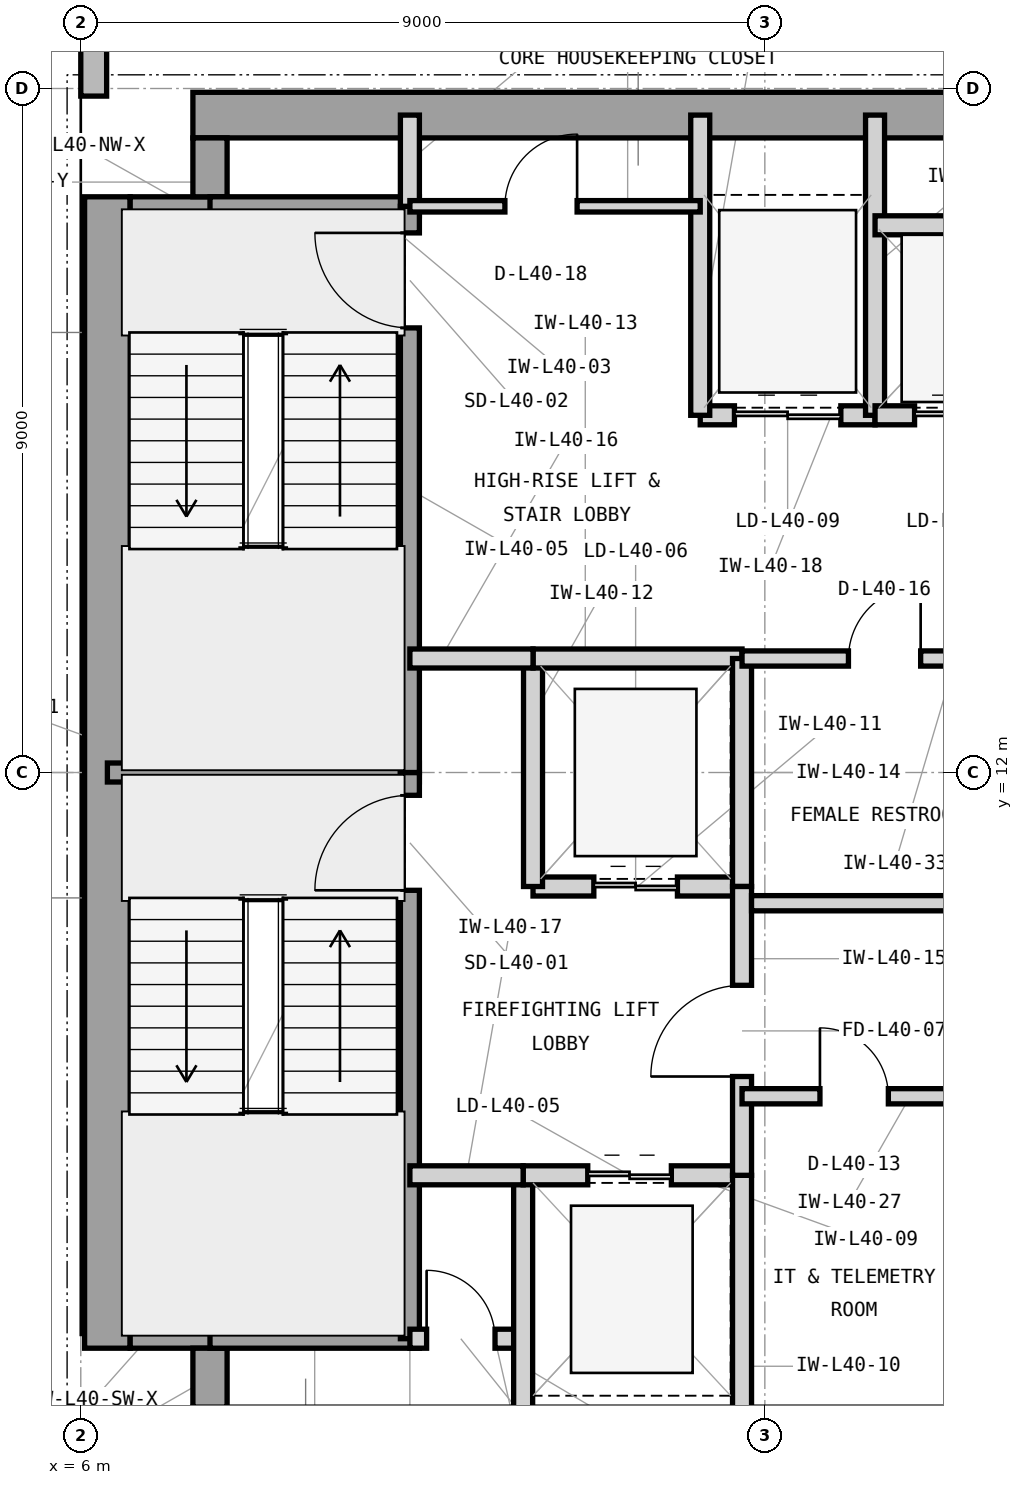
"""IFC4 building model, lengths in metres.
Left out: names, types, materials, properties, quantities, classifications, styles, units other than length and angle.
Written with IfcOpenShell. Run it as: python <this file> out.ifc"""

import sys

from ifc_helpers import new_model, si_unit, direction, frame, frame_2d, origin, place, context, subcontext, project, spatial, rectangle, extrude, element, fill, save


model = new_model("IFC4")
c1 = context("Model", 3, precision=1e-05, world=origin(), true_north=direction((0.0, 1.0)))
c2 = subcontext(c1, "Body", "Model", "MODEL_VIEW")
j1 = project(units=[si_unit("LENGTHUNIT", "METRE"), si_unit("PLANEANGLEUNIT", "RADIAN")], contexts=[c1])
p1 = place(None, origin())
s1 = spatial("IfcSite", under=j1, at=p1, CompositionType="ELEMENT")
p2 = place(p1, origin())
s2 = spatial("IfcBuilding", under=s1, at=p2, CompositionType="ELEMENT")
p3 = place(p2, frame((0.0, 0.0, 168.3)))
s3 = spatial("IfcBuildingStorey", under=s2, at=p3, CompositionType="ELEMENT", Elevation=168.3)
p4 = place(p3, frame((6.35, 4.425, 0.0), z_axis=(0.0, 0.0, 1.0), x_axis=(0.0, 1.0, 0.0)))
e1 = element("IfcWall", 1, at=p4, inside=s3, PredefinedType="SHEAR", context=c2, shape_type="SweptSolid", body=[
    extrude(rectangle(XDim=15.15, YDim=0.6, at=frame_2d((7.575, 0.0))), origin(), (0.0, 0.0, 1.0), 3.9),
])
p5 = place(p3, frame((7.475, 20.65, 0.0), z_axis=(0.0, 0.0, 1.0), x_axis=(1.0, 0.0, 0.0)))
e2 = element("IfcWall", 2, at=p5, inside=s3, PredefinedType="SHEAR", context=c2, shape_type="SweptSolid", body=[
    extrude(rectangle(XDim=12.325, YDim=0.6, at=frame_2d((6.163, 0.0))), origin(), (0.0, 0.0, 1.0), 3.9),
])
p6 = place(p3, frame((6.65, 4.65, 0.0), z_axis=(0.0, 0.0, 1.0), x_axis=(1.0, 0.0, 0.0)))
e3 = element("IfcWall", 3, at=p6, inside=s3, PredefinedType="SHEAR", context=c2, shape_type="SweptSolid", body=[
    extrude(rectangle(XDim=1.275, YDim=0.45, at=frame_2d((0.638, 0.0))), origin(), (0.0, 0.0, 1.0), 3.9),
])
p7 = place(p3, frame((7.7, 3.65, 0.0), z_axis=(0.0, 0.0, 1.0), x_axis=(0.0, 1.0, 0.0)))
e4 = element("IfcWall", 4, at=p7, inside=s3, PredefinedType="SHEAR", context=c2, shape_type="SweptSolid", body=[
    extrude(rectangle(XDim=0.775, YDim=0.45, at=frame_2d((0.388, 0.0))), origin(), (0.0, 0.0, 1.0), 3.9),
])
p8 = place(p3, frame((6.65, 19.35, 0.0), z_axis=(0.0, 0.0, 1.0), x_axis=(1.0, 0.0, 0.0)))
e5 = element("IfcWall", 5, at=p8, inside=s3, PredefinedType="SHEAR", context=c2, shape_type="SweptSolid", body=[
    extrude(rectangle(XDim=1.275, YDim=0.45, at=frame_2d((0.638, 0.0))), origin(), (0.0, 0.0, 1.0), 3.9),
])
p9 = place(p3, frame((7.7, 19.575, 0.0), z_axis=(0.0, 0.0, 1.0), x_axis=(0.0, 1.0, 0.0)))
e6 = element("IfcWall", 6, at=p9, inside=s3, PredefinedType="SHEAR", context=c2, shape_type="SweptSolid", body=[
    extrude(rectangle(XDim=0.775, YDim=0.45, at=frame_2d((0.388, 0.0))), origin(), (0.0, 0.0, 1.0), 3.9),
])
p10 = place(p3, frame((6.17, 43.4, 0.0), z_axis=(0.0, 0.0, 1.0), x_axis=(0.0, -1.0, 0.0)))
e7 = element("IfcWall", 7, at=p10, inside=s3, PredefinedType="STANDARD", context=c2, shape_type="SweptSolid", body=[
    extrude(rectangle(XDim=22.5, YDim=0.34, at=frame_2d((11.25, 0.0))), origin(), (0.0, 0.0, 1.0), 3.7),
])
p11 = place(p10, frame((10.1, 0.0, 0.9)))
e8 = element("IfcOpeningElement", 8, at=p11, cuts=e7, PredefinedType="OPENING", context=c2, shape_type="SweptSolid", body=[
    extrude(rectangle(XDim=2.3, YDim=2.2, at=frame_2d((1.15, 1.1))), frame((0.0, 0.18, 0.0), z_axis=(0.0, -1.0, 0.0), x_axis=(1.0, 0.0, 0.0)), (0.0, 0.0, 1.0), 0.36),
])
p12 = place(p10, frame((5.425, 0.0, 0.9)))
e9 = element("IfcOpeningElement", 9, at=p12, cuts=e7, PredefinedType="OPENING", context=c2, shape_type="SweptSolid", body=[
    extrude(rectangle(XDim=1.2, YDim=2.2, at=frame_2d((0.6, 1.1))), frame((0.0, 0.18, 0.0), z_axis=(0.0, -1.0, 0.0), x_axis=(1.0, 0.0, 0.0)), (0.0, 0.0, 1.0), 0.36),
])
p13 = place(p3, frame((6.35, 12.0, 0.0), z_axis=(0.0, 0.0, 1.0), x_axis=(1.0, 0.0, 0.0)))
e10 = element("IfcWall", 10, at=p13, inside=s3, PredefinedType="SHEAR", context=c2, shape_type="SweptSolid", body=[
    extrude(rectangle(XDim=4.105, YDim=0.25, at=frame_2d((2.052, 0.0))), origin(), (0.0, 0.0, 1.0), 3.9),
])
for number, where, z_axis, x_axis in (
    (11, (7.7, 4.55, 0.0), (0.0, 0.0, 1.0), (1.0, 0.0, 0.0)),
    (12, (7.7, 19.45, 0.0), (0.0, 0.0, 1.0), (1.0, 0.0, 0.0)),
):
    element("IfcWall", number, at=place(p3, frame(where, z_axis=z_axis, x_axis=x_axis)), inside=s3, PredefinedType="SHEAR", context=c2, shape_type="SweptSolid", body=[
        extrude(rectangle(XDim=2.755, YDim=0.25, at=frame_2d((1.377, 0.0))), origin(), (0.0, 0.0, 1.0), 3.9),
    ])
p14 = place(p3, frame((10.33, 4.55, 0.0), z_axis=(0.0, 0.0, 1.0), x_axis=(0.0, 1.0, 0.0)))
e13 = element("IfcWall", 13, at=p14, inside=s3, PredefinedType="SHEAR", context=c2, shape_type="SweptSolid", body=[
    extrude(rectangle(XDim=7.45, YDim=0.25, at=frame_2d((3.725, 0.0))), origin(), (0.0, 0.0, 1.0), 3.9),
])
p15 = place(p14, frame((5.9, 0.0, 0.0)))
e14 = element("IfcOpeningElement", 14, at=p15, cuts=e13, PredefinedType="OPENING", context=c2, shape_type="SweptSolid", body=[
    extrude(rectangle(XDim=1.25, YDim=2.2, at=frame_2d((0.625, 1.1))), frame((0.0, 0.135, 0.0), z_axis=(0.0, -1.0, 0.0), x_axis=(1.0, 0.0, 0.0)), (0.0, 0.0, 1.0), 0.27),
])
p16 = place(p3, frame((10.33, 12.0, 0.0), z_axis=(0.0, 0.0, 1.0), x_axis=(0.0, 1.0, 0.0)))
e15 = element("IfcWall", 15, at=p16, inside=s3, PredefinedType="SHEAR", context=c2, shape_type="SweptSolid", body=[
    extrude(rectangle(XDim=7.45, YDim=0.25, at=frame_2d((3.725, 0.0))), origin(), (0.0, 0.0, 1.0), 3.9),
])
p17 = place(p16, frame((5.85, 0.0, 0.0)))
e16 = element("IfcOpeningElement", 16, at=p17, cuts=e15, PredefinedType="OPENING", context=c2, shape_type="SweptSolid", body=[
    extrude(rectangle(XDim=1.25, YDim=2.2, at=frame_2d((0.625, 1.1))), frame((0.0, 0.135, 0.0), z_axis=(0.0, -1.0, 0.0), x_axis=(1.0, 0.0, 0.0)), (0.0, 0.0, 1.0), 0.27),
])
p18 = place(p3, frame((10.33, 4.55, 0.0), z_axis=(0.0, 0.0, 1.0), x_axis=(1.0, 0.0, 0.0)))
e17 = element("IfcWall", 17, at=p18, inside=s3, PredefinedType="PARTITIONING", context=c2, shape_type="SweptSolid", body=[
    extrude(rectangle(XDim=1.49, YDim=0.25, at=frame_2d((0.745, 0.0))), origin(), (0.0, 0.0, 1.0), 3.69),
])
p19 = place(p18, frame((0.22, 0.0, 0.0)))
e18 = element("IfcOpeningElement", 18, at=p19, cuts=e17, PredefinedType="OPENING", context=c2, shape_type="SweptSolid", body=[
    extrude(rectangle(XDim=0.9, YDim=2.1, at=frame_2d((0.45, 1.05))), frame((0.0, 0.135, 0.0), z_axis=(0.0, -1.0, 0.0), x_axis=(1.0, 0.0, 0.0)), (0.0, 0.0, 1.0), 0.27),
])
p20 = place(p3, frame((11.82, 3.35, 0.0), z_axis=(0.0, 0.0, 1.0), x_axis=(0.0, 1.0, 0.0)))
e19 = element("IfcWall", 19, at=p20, inside=s3, PredefinedType="PARTITIONING", context=c2, shape_type="SweptSolid", body=[
    extrude(rectangle(XDim=3.35, YDim=0.25, at=frame_2d((1.675, 0.0))), origin(), (0.0, 0.0, 1.0), 3.69),
])
p21 = place(p3, frame((10.33, 19.45, 0.0), z_axis=(0.0, 0.0, 1.0), x_axis=(0.0, 1.0, 0.0)))
e20 = element("IfcWall", 20, at=p21, inside=s3, PredefinedType="PARTITIONING", context=c2, shape_type="SweptSolid", body=[
    extrude(rectangle(XDim=1.2, YDim=0.25, at=frame_2d((0.6, 0.0))), origin(), (0.0, 0.0, 1.0), 3.073),
])
p22 = place(p3, frame((11.82, 6.7, 0.0), z_axis=(0.0, 0.0, 1.0), x_axis=(1.0, 0.0, 0.0)))
e21 = element("IfcWall", 21, at=p22, inside=s3, PredefinedType="PARTITIONING", context=c2, shape_type="SweptSolid", body=[
    extrude(rectangle(XDim=2.88, YDim=0.25, at=frame_2d((1.44, 0.0))), origin(), (0.0, 0.0, 1.0), 3.283),
])
p23 = place(p22, frame((0.85, 0.0, 0.0)))
e22 = element("IfcOpeningElement", 22, at=p23, cuts=e21, PredefinedType="OPENING", context=c2, shape_type="SweptSolid", body=[
    extrude(rectangle(XDim=1.1, YDim=2.25, at=frame_2d((0.55, 1.125))), frame((0.0, 0.135, 0.0), z_axis=(0.0, -1.0, 0.0), x_axis=(1.0, 0.0, 0.0)), (0.0, 0.0, 1.0), 0.27),
])
p24 = place(p3, frame((14.7, 3.35, 0.0), z_axis=(0.0, 0.0, 1.0), x_axis=(0.0, 1.0, 0.0)))
e23 = element("IfcWall", 23, at=p24, inside=s3, PredefinedType="PARTITIONING", context=c2, shape_type="SweptSolid", body=[
    extrude(rectangle(XDim=3.35, YDim=0.25, at=frame_2d((1.675, 0.0))), origin(), (0.0, 0.0, 1.0), 3.69),
])
p25 = place(p3, frame((11.95, 10.5, 0.0), z_axis=(0.0, 0.0, 1.0), x_axis=(1.0, 0.0, 0.0)))
e24 = element("IfcWall", 24, at=p25, inside=s3, PredefinedType="PARTITIONING", context=c2, shape_type="SweptSolid", body=[
    extrude(rectangle(XDim=2.75, YDim=0.25, at=frame_2d((1.375, 0.0))), origin(), (0.0, 0.0, 1.0), 3.283),
])
p26 = place(p25, frame((0.8, 0.0, 0.0)))
e25 = element("IfcOpeningElement", 25, at=p26, cuts=e24, PredefinedType="OPENING", context=c2, shape_type="SweptSolid", body=[
    extrude(rectangle(XDim=1.1, YDim=2.25, at=frame_2d((0.55, 1.125))), frame((0.0, 0.135, 0.0), z_axis=(0.0, -1.0, 0.0), x_axis=(1.0, 0.0, 0.0)), (0.0, 0.0, 1.0), 0.27),
])
p27 = place(p3, frame((11.95, 10.5, 0.0), z_axis=(0.0, 0.0, 1.0), x_axis=(0.0, 1.0, 0.0)))
e26 = element("IfcWall", 26, at=p27, inside=s3, PredefinedType="PARTITIONING", context=c2, shape_type="SweptSolid", body=[
    extrude(rectangle(XDim=3.0, YDim=0.25, at=frame_2d((1.5, 0.0))), origin(), (0.0, 0.0, 1.0), 3.69),
])
p28 = place(p3, frame((11.95, 13.5, 0.0), z_axis=(0.0, 0.0, 1.0), x_axis=(1.0, 0.0, 0.0)))
e27 = element("IfcWall", 27, at=p28, inside=s3, PredefinedType="PARTITIONING", context=c2, shape_type="SweptSolid", body=[
    extrude(rectangle(XDim=2.75, YDim=0.25, at=frame_2d((1.375, 0.0))), origin(), (0.0, 0.0, 1.0), 3.283),
])
p29 = place(p3, frame((14.7, 10.5, 0.0), z_axis=(0.0, 0.0, 1.0), x_axis=(0.0, 1.0, 0.0)))
e28 = element("IfcWall", 28, at=p29, inside=s3, PredefinedType="PARTITIONING", context=c2, shape_type="SweptSolid", body=[
    extrude(rectangle(XDim=3.0, YDim=0.25, at=frame_2d((1.5, 0.0))), origin(), (0.0, 0.0, 1.0), 3.69),
])
p30 = place(p3, frame((14.7, 6.7, 0.0), z_axis=(0.0, 0.0, 1.0), x_axis=(0.0, 1.0, 0.0)))
e29 = element("IfcWall", 29, at=p30, inside=s3, PredefinedType="PARTITIONING", context=c2, shape_type="SweptSolid", body=[
    extrude(rectangle(XDim=3.8, YDim=0.25, at=frame_2d((1.9, 0.0))), origin(), (0.0, 0.0, 1.0), 3.69),
])
p31 = place(p30, frame((1.3, 0.0, 0.0)))
e30 = element("IfcOpeningElement", 30, at=p31, cuts=e29, PredefinedType="OPENING", context=c2, shape_type="SweptSolid", body=[
    extrude(rectangle(XDim=1.2, YDim=2.2, at=frame_2d((0.6, 1.1))), frame((0.0, 0.135, 0.0), z_axis=(0.0, -1.0, 0.0), x_axis=(1.0, 0.0, 0.0)), (0.0, 0.0, 1.0), 0.27),
])
p32 = place(p3, frame((10.33, 13.5, 0.0), z_axis=(0.0, 0.0, 1.0), x_axis=(1.0, 0.0, 0.0)))
e31 = element("IfcWall", 31, at=p32, inside=s3, PredefinedType="PARTITIONING", context=c2, shape_type="SweptSolid", body=[
    extrude(rectangle(XDim=1.62, YDim=0.25, at=frame_2d((0.81, 0.0))), origin(), (0.0, 0.0, 1.0), 3.283),
])
p33 = place(p3, frame((10.33, 6.7, 0.0), z_axis=(0.0, 0.0, 1.0), x_axis=(1.0, 0.0, 0.0)))
e32 = element("IfcWall", 32, at=p33, inside=s3, PredefinedType="PARTITIONING", context=c2, shape_type="SweptSolid", body=[
    extrude(rectangle(XDim=1.49, YDim=0.25, at=frame_2d((0.745, 0.0))), origin(), (0.0, 0.0, 1.0), 3.283),
])
p34 = place(p3, frame((14.15, 16.7, 0.0), z_axis=(0.0, 0.0, 1.0), x_axis=(1.0, 0.0, 0.0)))
e33 = element("IfcWall", 33, at=p34, inside=s3, PredefinedType="PARTITIONING", context=c2, shape_type="SweptSolid", body=[
    extrude(rectangle(XDim=2.3, YDim=0.25, at=frame_2d((1.15, 0.0))), origin(), (0.0, 0.0, 1.0), 3.283),
])
p35 = place(p34, frame((0.45, 0.0, 0.0)))
e34 = element("IfcOpeningElement", 34, at=p35, cuts=e33, PredefinedType="OPENING", context=c2, shape_type="SweptSolid", body=[
    extrude(rectangle(XDim=1.4, YDim=2.35, at=frame_2d((0.7, 1.175))), frame((0.0, 0.135, 0.0), z_axis=(0.0, -1.0, 0.0), x_axis=(1.0, 0.0, 0.0)), (0.0, 0.0, 1.0), 0.27),
])
for number, where, z_axis, x_axis in (
    (35, (14.15, 16.7, 0.0), (0.0, 0.0, 1.0), (0.0, 1.0, 0.0)),
    (36, (16.45, 16.7, 0.0), (0.0, 0.0, 1.0), (0.0, 1.0, 0.0)),
):
    element("IfcWall", number, at=place(p3, frame(where, z_axis=z_axis, x_axis=x_axis)), inside=s3, PredefinedType="PARTITIONING", context=c2, shape_type="SweptSolid", body=[
        extrude(rectangle(XDim=3.95, YDim=0.25, at=frame_2d((1.975, 0.0))), origin(), (0.0, 0.0, 1.0), 3.69),
    ])
p36 = place(p3, frame((16.45, 16.7, 0.0), z_axis=(0.0, 0.0, 1.0), x_axis=(1.0, 0.0, 0.0)))
e37 = element("IfcWall", 37, at=p36, inside=s3, PredefinedType="PARTITIONING", context=c2, shape_type="SweptSolid", body=[
    extrude(rectangle(XDim=2.3, YDim=0.25, at=frame_2d((1.15, 0.0))), origin(), (0.0, 0.0, 1.0), 3.283),
])
p37 = place(p36, frame((0.52, 0.0, 0.0)))
e38 = element("IfcOpeningElement", 38, at=p37, cuts=e37, PredefinedType="OPENING", context=c2, shape_type="SweptSolid", body=[
    extrude(rectangle(XDim=1.15, YDim=2.25, at=frame_2d((0.575, 1.125))), frame((0.0, 0.135, 0.0), z_axis=(0.0, -1.0, 0.0), x_axis=(1.0, 0.0, 0.0)), (0.0, 0.0, 1.0), 0.27),
])
p38 = place(p3, frame((16.45, 19.2, 0.0), z_axis=(0.0, 0.0, 1.0), x_axis=(1.0, 0.0, 0.0)))
e39 = element("IfcWall", 39, at=p38, inside=s3, PredefinedType="PARTITIONING", context=c2, shape_type="SweptSolid", body=[
    extrude(rectangle(XDim=7.2, YDim=0.25, at=frame_2d((3.6, 0.0))), origin(), (0.0, 0.0, 1.0), 3.69),
])
p39 = place(p3, frame((14.7, 7.74, 0.0), z_axis=(0.0, 0.0, 1.0), x_axis=(1.0, 0.0, 0.0)))
e40 = element("IfcWall", 40, at=p39, inside=s3, PredefinedType="PARTITIONING", context=c2, shape_type="SweptSolid", body=[
    extrude(rectangle(XDim=2.95, YDim=0.2, at=frame_2d((1.475, 0.0))), origin(), (0.0, 0.0, 1.0), 3.69),
])
p40 = place(p39, frame((1.025, 0.0, 0.0)))
e41 = element("IfcOpeningElement", 41, at=p40, cuts=e40, PredefinedType="OPENING", context=c2, shape_type="SweptSolid", body=[
    extrude(rectangle(XDim=0.9, YDim=2.1, at=frame_2d((0.45, 1.05))), frame((0.0, 0.11, 0.0), z_axis=(0.0, -1.0, 0.0), x_axis=(1.0, 0.0, 0.0)), (0.0, 0.0, 1.0), 0.22),
])
p41 = place(p3, frame((14.825, 10.28, 0.0), z_axis=(0.0, 0.0, 1.0), x_axis=(1.0, 0.0, 0.0)))
e42 = element("IfcWall", 42, at=p41, inside=s3, PredefinedType="PARTITIONING", context=c2, shape_type="SweptSolid", body=[
    extrude(rectangle(XDim=8.825, YDim=0.2, at=frame_2d((4.413, 0.0))), origin(), (0.0, 0.0, 1.0), 3.69),
])
p42 = place(p3, frame((14.7, 13.5, 0.0), z_axis=(0.0, 0.0, 1.0), x_axis=(1.0, 0.0, 0.0)))
e43 = element("IfcWall", 43, at=p42, inside=s3, PredefinedType="PARTITIONING", context=c2, shape_type="SweptSolid", body=[
    extrude(rectangle(XDim=3.75, YDim=0.2, at=frame_2d((1.875, 0.0))), origin(), (0.0, 0.0, 1.0), 3.283),
])
p43 = place(p42, frame((1.4, 0.0, 0.0)))
e44 = element("IfcOpeningElement", 44, at=p43, cuts=e43, PredefinedType="OPENING", context=c2, shape_type="SweptSolid", body=[
    extrude(rectangle(XDim=0.95, YDim=2.1, at=frame_2d((0.475, 1.05))), frame((0.0, 0.11, 0.0), z_axis=(0.0, -1.0, 0.0), x_axis=(1.0, 0.0, 0.0)), (0.0, 0.0, 1.0), 0.22),
])
p44 = place(p3, frame((10.33, 19.45, 0.0), z_axis=(0.0, 0.0, 1.0), x_axis=(1.0, 0.0, 0.0)))
e45 = element("IfcWall", 45, at=p44, inside=s3, PredefinedType="PARTITIONING", context=c2, shape_type="SweptSolid", body=[
    extrude(rectangle(XDim=3.82, YDim=0.15, at=frame_2d((1.91, 0.0))), origin(), (0.0, 0.0, 1.0), 3.69),
])
p45 = place(p44, frame((1.25, 0.0, 0.0)))
e46 = element("IfcOpeningElement", 46, at=p45, cuts=e45, PredefinedType="OPENING", context=c2, shape_type="SweptSolid", body=[
    extrude(rectangle(XDim=0.95, YDim=2.1, at=frame_2d((0.475, 1.05))), frame((0.0, 0.085, 0.0), z_axis=(0.0, -1.0, 0.0), x_axis=(1.0, 0.0, 0.0)), (0.0, 0.0, 1.0), 0.17),
])
p46 = place(p15, origin())
e47 = element("IfcDoor", 47, at=p46, inside=s3, OperationType="SINGLE_SWING_LEFT", PredefinedType="DOOR", context=c2, shape_type="SweptSolid", body=[
    extrude(rectangle(XDim=1.25, YDim=2.2, at=frame_2d((0.625, 1.1))), frame((0.0, 0.025, 0.0), z_axis=(0.0, -1.0, 0.0), x_axis=(1.0, 0.0, 0.0)), (0.0, 0.0, 1.0), 0.05),
])
fill(e14, e47)
p47 = place(p17, origin())
e48 = element("IfcDoor", 48, at=p47, inside=s3, OperationType="SINGLE_SWING_RIGHT", PredefinedType="DOOR", context=c2, shape_type="SweptSolid", body=[
    extrude(rectangle(XDim=1.25, YDim=2.2, at=frame_2d((0.625, 1.1))), frame((0.0, 0.025, 0.0), z_axis=(0.0, -1.0, 0.0), x_axis=(1.0, 0.0, 0.0)), (0.0, 0.0, 1.0), 0.05),
])
fill(e16, e48)
p48 = place(p19, origin())
e49 = element("IfcDoor", 49, at=p48, inside=s3, OperationType="SINGLE_SWING_LEFT", PredefinedType="TRAPDOOR", context=c2, shape_type="SweptSolid", body=[
    extrude(rectangle(XDim=0.9, YDim=2.1, at=frame_2d((0.45, 1.05))), frame((0.0, 0.025, 0.0), z_axis=(0.0, -1.0, 0.0), x_axis=(1.0, 0.0, 0.0)), (0.0, 0.0, 1.0), 0.05),
])
fill(e18, e49)
p49 = place(p23, origin())
e50 = element("IfcDoor", 50, at=p49, inside=s3, OperationType="DOUBLE_DOOR_SLIDING", PredefinedType="DOOR", context=c2, shape_type="SweptSolid", body=[
    extrude(rectangle(XDim=1.1, YDim=2.25, at=frame_2d((0.55, 1.125))), frame((0.0, 0.025, 0.0), z_axis=(0.0, -1.0, 0.0), x_axis=(1.0, 0.0, 0.0)), (0.0, 0.0, 1.0), 0.05),
])
fill(e22, e50)
p50 = place(p26, origin())
e51 = element("IfcDoor", 51, at=p50, inside=s3, OperationType="DOUBLE_DOOR_SLIDING", PredefinedType="DOOR", context=c2, shape_type="SweptSolid", body=[
    extrude(rectangle(XDim=1.1, YDim=2.25, at=frame_2d((0.55, 1.125))), frame((0.0, 0.025, 0.0), z_axis=(0.0, -1.0, 0.0), x_axis=(1.0, 0.0, 0.0)), (0.0, 0.0, 1.0), 0.05),
])
fill(e25, e51)
p51 = place(p31, origin())
e52 = element("IfcDoor", 52, at=p51, inside=s3, OperationType="SINGLE_SWING_LEFT", PredefinedType="DOOR", context=c2, shape_type="SweptSolid", body=[
    extrude(rectangle(XDim=1.2, YDim=2.2, at=frame_2d((0.6, 1.1))), frame((0.0, 0.025, 0.0), z_axis=(0.0, -1.0, 0.0), x_axis=(1.0, 0.0, 0.0)), (0.0, 0.0, 1.0), 0.05),
])
fill(e30, e52)
p52 = place(p35, origin())
e53 = element("IfcDoor", 53, at=p52, inside=s3, OperationType="DOUBLE_DOOR_SLIDING", PredefinedType="DOOR", context=c2, shape_type="SweptSolid", body=[
    extrude(rectangle(XDim=1.4, YDim=2.35, at=frame_2d((0.7, 1.175))), frame((0.0, 0.025, 0.0), z_axis=(0.0, -1.0, 0.0), x_axis=(1.0, 0.0, 0.0)), (0.0, 0.0, 1.0), 0.05),
])
fill(e34, e53)
p53 = place(p37, origin())
e54 = element("IfcDoor", 54, at=p53, inside=s3, OperationType="DOUBLE_DOOR_SLIDING", PredefinedType="DOOR", context=c2, shape_type="SweptSolid", body=[
    extrude(rectangle(XDim=1.15, YDim=2.25, at=frame_2d((0.575, 1.125))), frame((0.0, 0.025, 0.0), z_axis=(0.0, -1.0, 0.0), x_axis=(1.0, 0.0, 0.0)), (0.0, 0.0, 1.0), 0.05),
])
fill(e38, e54)
p54 = place(p40, origin())
e55 = element("IfcDoor", 55, at=p54, inside=s3, OperationType="SINGLE_SWING_LEFT", PredefinedType="TRAPDOOR", context=c2, shape_type="SweptSolid", body=[
    extrude(rectangle(XDim=0.9, YDim=2.1, at=frame_2d((0.45, 1.05))), frame((0.0, 0.025, 0.0), z_axis=(0.0, -1.0, 0.0), x_axis=(1.0, 0.0, 0.0)), (0.0, 0.0, 1.0), 0.05),
])
fill(e41, e55)
p55 = place(p43, origin())
e56 = element("IfcDoor", 56, at=p55, inside=s3, OperationType="SINGLE_SWING_RIGHT", PredefinedType="DOOR", context=c2, shape_type="SweptSolid", body=[
    extrude(rectangle(XDim=0.95, YDim=2.1, at=frame_2d((0.475, 1.05))), frame((0.0, 0.025, 0.0), z_axis=(0.0, -1.0, 0.0), x_axis=(1.0, 0.0, 0.0)), (0.0, 0.0, 1.0), 0.05),
])
fill(e44, e56)
p56 = place(p45, origin())
e57 = element("IfcDoor", 57, at=p56, inside=s3, OperationType="SINGLE_SWING_RIGHT", PredefinedType="DOOR", context=c2, shape_type="SweptSolid", body=[
    extrude(rectangle(XDim=0.95, YDim=2.1, at=frame_2d((0.475, 1.05))), frame((0.0, 0.025, 0.0), z_axis=(0.0, -1.0, 0.0), x_axis=(1.0, 0.0, 0.0)), (0.0, 0.0, 1.0), 0.05),
])
fill(e46, e57)
save(model, sys.argv[1])
